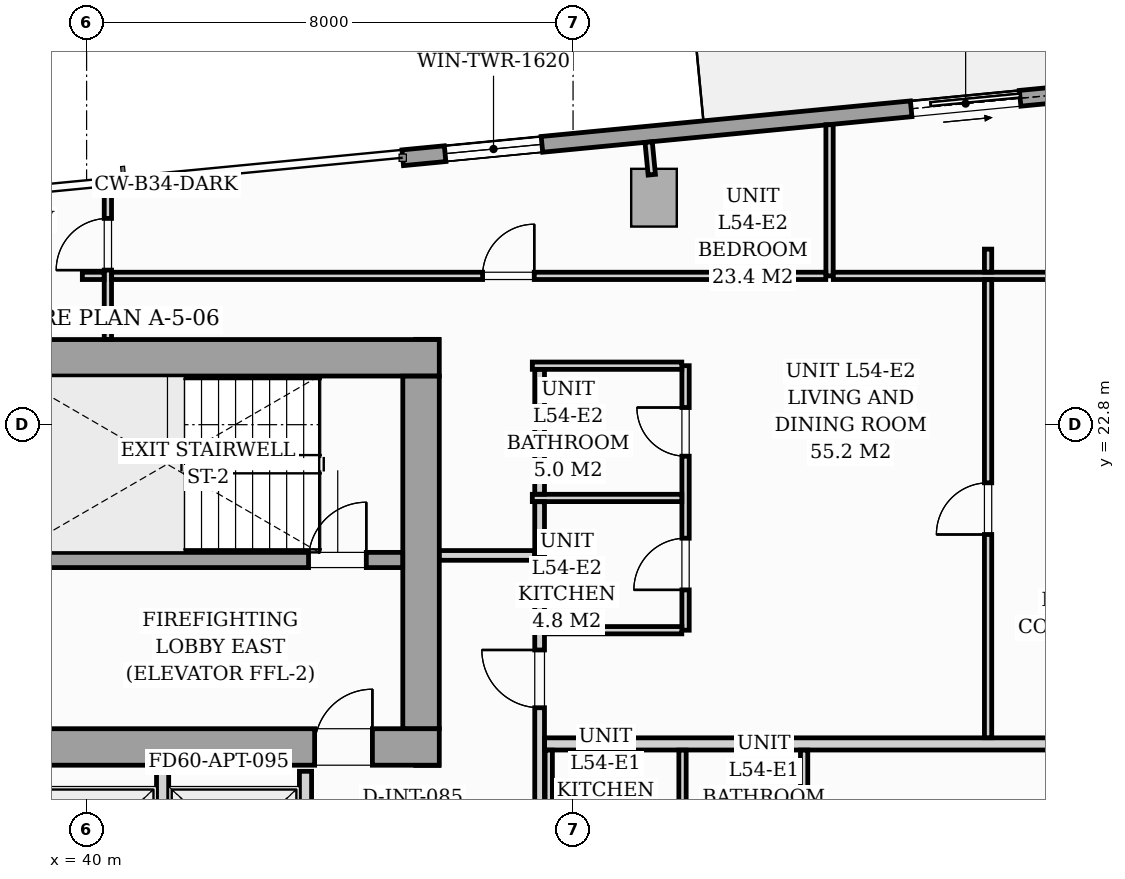
"""IFC4 building model, lengths in metres.
Left out: names, types, materials, properties, quantities, classifications, styles, units other than length and angle.
Written with IfcOpenShell. Run it as: python <this file> out.ifc"""

import sys

from ifc_helpers import new_model, si_unit, direction, frame, frame_2d, origin, origin_2d, place, context, subcontext, project, spatial, rectangle, i_section, extrude, source, transform, mapped, element, fill, save


model = new_model("IFC4")
c1 = context("Model", 3, precision=1e-05, world=origin(), true_north=direction((0.0, 1.0)))
c2 = subcontext(c1, "Body", "Model", "MODEL_VIEW")
j1 = project(units=[si_unit("LENGTHUNIT", "METRE"), si_unit("PLANEANGLEUNIT", "RADIAN")], contexts=[c1])
p1 = place(None, origin())
s1 = spatial("IfcSite", under=j1, at=p1, CompositionType="ELEMENT")
p2 = place(p1, origin())
s2 = spatial("IfcBuilding", under=s1, at=p2, CompositionType="ELEMENT")
p3 = place(p2, frame((0.0, 0.0, 189.0)))
s3 = spatial("IfcBuildingStorey", under=s2, at=p3, CompositionType="ELEMENT", Elevation=189.0)
m1 = source(origin(), c2, "Body", "SweptSolid", [
    extrude(i_section(OverallWidth=0.416, OverallDepth=0.446, WebThickness=0.039, FlangeThickness=0.063, FilletRadius=0.018, at=origin_2d()), origin(), (0.0, 0.0, 1.0), 3.196),
])
for number, where, z_axis, x_axis in (
    (1, (45.6, 17.4, 0.002), (0.0, 0.0, 1.0), (1.0, 0.0, 0.0)),
    (2, (45.6, 24.0, 0.002), (0.0, 0.0, 1.0), (1.0, 0.0, 0.0)),
):
    element("IfcColumn", number, at=place(p3, frame(where, z_axis=z_axis, x_axis=x_axis)), inside=s3, PredefinedType="PILASTER", context=c2, shape_type="MappedRepresentation", body=[
        mapped(m1, transform((0.0, 0.0, 0.0), scale=1.0)),
    ])
m2 = source(origin(), c2, "Body", "SweptSolid", [
    extrude(rectangle(XDim=0.75, YDim=0.95, at=origin_2d()), origin(), (0.0, 0.0, 1.0), 3.196),
])
p4 = place(p3, frame((49.331, 26.533, 0.002), z_axis=(0.0, 0.0, 1.0), x_axis=(0.995396198367, 0.09584575252, 0.0)))
e3 = element("IfcColumn", 3, at=p4, inside=s3, PredefinedType="COLUMN", context=c2, shape_type="MappedRepresentation", body=[
    mapped(m2, transform((0.0, 0.0, 0.0), scale=1.0)),
])
p5 = place(p3, frame((45.199, 27.19, 0.0), z_axis=(0.0, 0.0, 1.0), x_axis=(0.995397074604, 0.095836652014, 0.0)))
e4 = element("IfcWall", 4, at=p5, inside=s3, PredefinedType="STANDARD", context=c2, shape_type="SweptSolid", body=[
    extrude(rectangle(XDim=16.1, YDim=0.26, at=frame_2d((8.05, 0.0))), origin(), (0.0, 0.0, 1.0), 2.94),
])
p6 = place(p5, frame((8.4, 0.0, 0.0)))
e5 = element("IfcOpeningElement", 5, at=p6, cuts=e4, PredefinedType="OPENING", context=c2, shape_type="SweptSolid", body=[
    extrude(rectangle(XDim=1.8, YDim=2.06, at=frame_2d((0.9, 1.03))), frame((0.0, 0.14, 0.0), z_axis=(0.0, -1.0, 0.0), x_axis=(1.0, 0.0, 0.0)), (0.0, 0.0, 1.0), 0.28),
])
p7 = place(p5, frame((0.7, 0.0, 0.65)))
e6 = element("IfcOpeningElement", 6, at=p7, cuts=e4, PredefinedType="OPENING", context=c2, shape_type="SweptSolid", body=[
    extrude(rectangle(XDim=1.6, YDim=1.5, at=frame_2d((0.8, 0.75))), frame((0.0, 0.14, 0.0), z_axis=(0.0, -1.0, 0.0), x_axis=(1.0, 0.0, 0.0)), (0.0, 0.0, 1.0), 0.28),
])
p8 = place(p3, frame((26.2, 17.5, 0.0), z_axis=(0.0, 0.0, 1.0), x_axis=(1.0, 0.0, 0.0)))
e7 = element("IfcWall", 7, at=p8, inside=s3, PredefinedType="SHEAR", context=c2, shape_type="SweptSolid", body=[
    extrude(rectangle(XDim=19.6, YDim=0.6, at=frame_2d((9.8, 0.0))), origin(), (0.0, 0.0, 1.0), 3.2),
])
p9 = place(p8, frame((0.95, 0.0, 0.0)))
e8 = element("IfcOpeningElement", 8, at=p9, cuts=e7, PredefinedType="OPENING", context=c2, shape_type="SweptSolid", body=[
    extrude(rectangle(XDim=0.95, YDim=2.06, at=frame_2d((0.475, 1.03))), frame((0.0, 0.31, 0.0), z_axis=(0.0, -1.0, 0.0), x_axis=(1.0, 0.0, 0.0)), (0.0, 0.0, 1.0), 0.62),
])
p10 = place(p8, frame((9.38, 0.0, 0.0)))
e9 = element("IfcOpeningElement", 9, at=p10, cuts=e7, PredefinedType="OPENING", context=c2, shape_type="SweptSolid", body=[
    extrude(rectangle(XDim=0.85, YDim=2.0, at=frame_2d((0.425, 1.0))), frame((0.0, 0.31, 0.0), z_axis=(0.0, -1.0, 0.0), x_axis=(1.0, 0.0, 0.0)), (0.0, 0.0, 1.0), 0.62),
])
p11 = place(p8, frame((17.55, 0.0, 0.0)))
e10 = element("IfcOpeningElement", 10, at=p11, cuts=e7, PredefinedType="OPENING", context=c2, shape_type="SweptSolid", body=[
    extrude(rectangle(XDim=0.95, YDim=2.06, at=frame_2d((0.475, 1.03))), frame((0.0, 0.31, 0.0), z_axis=(0.0, -1.0, 0.0), x_axis=(1.0, 0.0, 0.0)), (0.0, 0.0, 1.0), 0.62),
])
p12 = place(p3, frame((26.2, 23.9, 0.0), z_axis=(0.0, 0.0, 1.0), x_axis=(1.0, 0.0, 0.0)))
e11 = element("IfcWall", 11, at=p12, inside=s3, PredefinedType="SHEAR", context=c2, shape_type="SweptSolid", body=[
    extrude(rectangle(XDim=19.6, YDim=0.6, at=frame_2d((9.8, 0.0))), origin(), (0.0, 0.0, 1.0), 3.2),
])
p13 = place(p3, frame((45.5, 17.802, 0.0), z_axis=(0.0, 0.0, 1.0), x_axis=(0.0, 1.0, 0.0)))
e12 = element("IfcWall", 12, at=p13, inside=s3, PredefinedType="SHEAR", context=c2, shape_type="SweptSolid", body=[
    extrude(rectangle(XDim=5.796, YDim=0.6, at=frame_2d((2.898, 0.0))), origin(), (0.0, 0.0, 1.0), 3.2),
])
p14 = place(p3, frame((37.05, 20.575, 0.0), z_axis=(0.0, 0.0, 1.0), x_axis=(1.0, 0.0, 0.0)))
e13 = element("IfcWall", 13, at=p14, inside=s3, PredefinedType="SOLIDWALL", context=c2, shape_type="SweptSolid", body=[
    extrude(rectangle(XDim=8.148, YDim=0.25, at=frame_2d((4.074, 0.0))), origin(), (0.0, 0.0, 1.0), 3.2),
])
p15 = place(p14, frame((6.6, 0.0, 0.0)))
e14 = element("IfcOpeningElement", 14, at=p15, cuts=e13, PredefinedType="OPENING", context=c2, shape_type="SweptSolid", body=[
    extrude(rectangle(XDim=0.95, YDim=2.06, at=frame_2d((0.475, 1.03))), frame((0.0, 0.135, 0.0), z_axis=(0.0, -1.0, 0.0), x_axis=(1.0, 0.0, 0.0)), (0.0, 0.0, 1.0), 0.27),
])
for number, where, z_axis, x_axis in (
    (15, (41.25, 14.75, 0.0), (0.0, 0.0, 1.0), (0.0, 1.0, 0.0)),
    (16, (43.6, 14.75, 0.0), (0.0, 0.0, 1.0), (0.0, 1.0, 0.0)),
):
    element("IfcWall", number, at=place(p3, frame(where, z_axis=z_axis, x_axis=x_axis)), inside=s3, PredefinedType="PARTITIONING", context=c2, shape_type="SweptSolid", body=[
        extrude(rectangle(XDim=2.35, YDim=0.2, at=frame_2d((1.175, 0.0))), origin(), (0.0, 0.0, 1.0), 2.94),
    ])
p16 = place(p3, frame((47.45, 13.362, 0.0), z_axis=(0.0, 0.0, 1.0), x_axis=(0.0, 1.0, 0.0)))
e17 = element("IfcWall", 17, at=p16, inside=s3, PredefinedType="PARTITIONING", context=c2, shape_type="SweptSolid", body=[
    extrude(rectangle(XDim=7.288, YDim=0.16, at=frame_2d((3.644, 0.0))), origin(), (0.0, 0.0, 1.0), 2.94),
])
p17 = place(p16, frame((0.493, 0.0, 0.0)))
e18 = element("IfcOpeningElement", 18, at=p17, cuts=e17, PredefinedType="OPENING", context=c2, shape_type="SweptSolid", body=[
    extrude(rectangle(XDim=0.95, YDim=2.06, at=frame_2d((0.475, 1.03))), frame((0.0, 0.09, 0.0), z_axis=(0.0, -1.0, 0.0), x_axis=(1.0, 0.0, 0.0)), (0.0, 0.0, 1.0), 0.18),
])
p18 = place(p16, frame((4.783, 0.0, 0.0)))
e19 = element("IfcOpeningElement", 19, at=p18, cuts=e17, PredefinedType="OPENING", context=c2, shape_type="SweptSolid", body=[
    extrude(rectangle(XDim=0.95, YDim=2.06, at=frame_2d((0.475, 1.03))), frame((0.0, 0.09, 0.0), z_axis=(0.0, -1.0, 0.0), x_axis=(1.0, 0.0, 0.0)), (0.0, 0.0, 1.0), 0.18),
])
p19 = place(p3, frame((45.802, 20.65, 0.0), z_axis=(0.0, 0.0, 1.0), x_axis=(1.0, 0.0, 0.0)))
e20 = element("IfcWall", 20, at=p19, inside=s3, PredefinedType="PARTITIONING", context=c2, shape_type="SweptSolid", body=[
    extrude(rectangle(XDim=1.566, YDim=0.16, at=frame_2d((0.783, 0.0))), origin(), (0.0, 0.0, 1.0), 2.94),
])
p20 = place(p3, frame((47.532, 17.55, 0.0), z_axis=(0.0, 0.0, 1.0), x_axis=(1.0, 0.0, 0.0)))
e21 = element("IfcWall", 21, at=p20, inside=s3, PredefinedType="PARTITIONING", context=c2, shape_type="SweptSolid", body=[
    extrude(rectangle(XDim=17.201, YDim=0.2, at=frame_2d((8.601, 0.0))), origin(), (0.0, 0.0, 1.0), 2.281),
])
for number, where, z_axis, x_axis in (
    (22, (47.6, 15.262, 0.0), (0.0, 0.0, 1.0), (0.0, 1.0, 0.0)),
    (23, (49.8, 15.262, 0.0), (0.0, 0.0, 1.0), (0.0, 1.0, 0.0)),
    (24, (51.8, 15.262, 0.0), (0.0, 0.0, 1.0), (0.0, 1.0, 0.0)),
):
    element("IfcWall", number, at=place(p3, frame(where, z_axis=z_axis, x_axis=x_axis)), inside=s3, PredefinedType="PARTITIONING", context=c2, shape_type="SweptSolid", body=[
        extrude(rectangle(XDim=2.186, YDim=0.12, at=frame_2d((1.093, 0.0))), origin(), (0.0, 0.0, 1.0), 2.94),
    ])
p21 = place(p3, frame((49.85, 19.42, 0.0), z_axis=(0.0, 0.0, 1.0), x_axis=(0.0, 1.0, 0.0)))
e25 = element("IfcWall", 25, at=p21, inside=s3, PredefinedType="PARTITIONING", context=c2, shape_type="SweptSolid", body=[
    extrude(rectangle(XDim=4.35, YDim=0.12, at=frame_2d((2.175, 0.0))), origin(), (0.0, 0.0, 1.0), 2.94),
])
p22 = place(p21, frame((0.663, 0.0, 0.0)))
e26 = element("IfcOpeningElement", 26, at=p22, cuts=e25, PredefinedType="OPENING", context=c2, shape_type="SweptSolid", body=[
    extrude(rectangle(XDim=0.85, YDim=2.05, at=frame_2d((0.425, 1.025))), frame((0.0, 0.07, 0.0), z_axis=(0.0, -1.0, 0.0), x_axis=(1.0, 0.0, 0.0)), (0.0, 0.0, 1.0), 0.14),
])
p23 = place(p21, frame((2.862, 0.0, 0.0)))
e27 = element("IfcOpeningElement", 27, at=p23, cuts=e25, PredefinedType="OPENING", context=c2, shape_type="SweptSolid", body=[
    extrude(rectangle(XDim=0.8, YDim=2.02, at=frame_2d((0.4, 1.01))), frame((0.0, 0.07, 0.0), z_axis=(0.0, -1.0, 0.0), x_axis=(1.0, 0.0, 0.0)), (0.0, 0.0, 1.0), 0.14),
])
p24 = place(p3, frame((47.33, 21.595, 0.0), z_axis=(0.0, 0.0, 1.0), x_axis=(1.0, 0.0, 0.0)))
e28 = element("IfcWall", 28, at=p24, inside=s3, PredefinedType="PARTITIONING", context=c2, shape_type="SweptSolid", body=[
    extrude(rectangle(XDim=2.458, YDim=0.12, at=frame_2d((1.229, 0.0))), origin(), (0.0, 0.0, 1.0), 2.94),
])
p25 = place(p3, frame((47.532, 19.42, 0.0), z_axis=(0.0, 0.0, 1.0), x_axis=(1.0, 0.0, 0.0)))
e29 = element("IfcWall", 29, at=p25, inside=s3, PredefinedType="PARTITIONING", context=c2, shape_type="SweptSolid", body=[
    extrude(rectangle(XDim=2.256, YDim=0.12, at=frame_2d((1.128, 0.0))), origin(), (0.0, 0.0, 1.0), 2.94),
])
p26 = place(p3, frame((47.33, 23.77, 0.0), z_axis=(0.0, 0.0, 1.0), x_axis=(1.0, 0.0, 0.0)))
e30 = element("IfcWall", 30, at=p26, inside=s3, PredefinedType="PARTITIONING", context=c2, shape_type="SweptSolid", body=[
    extrude(rectangle(XDim=2.458, YDim=0.12, at=frame_2d((1.229, 0.0))), origin(), (0.0, 0.0, 1.0), 2.94),
])
p27 = place(p3, frame((47.45, 20.65, 0.0), z_axis=(0.0, 0.0, 1.0), x_axis=(0.0, 1.0, 0.0)))
e31 = element("IfcWall", 31, at=p27, inside=s3, PredefinedType="PARTITIONING", context=c2, shape_type="SweptSolid", body=[
    extrude(rectangle(XDim=0.883, YDim=0.16, at=frame_2d((0.441, 0.0))), origin(), (0.0, 0.0, 1.0), 2.94),
])
p28 = place(p3, frame((47.45, 21.657, 0.0), z_axis=(0.0, 0.0, 1.0), x_axis=(0.0, 1.0, 0.0)))
e32 = element("IfcWall", 32, at=p28, inside=s3, PredefinedType="PARTITIONING", context=c2, shape_type="SweptSolid", body=[
    extrude(rectangle(XDim=2.051, YDim=0.16, at=frame_2d((1.025, 0.0))), origin(), (0.0, 0.0, 1.0), 2.94),
])
p29 = place(p3, frame((40.35, 24.202, 0.0), z_axis=(0.0, 0.0, 1.0), x_axis=(0.0, 1.0, 0.0)))
e33 = element("IfcWall", 33, at=p29, inside=s3, PredefinedType="PARTITIONING", context=c2, shape_type="SweptSolid", body=[
    extrude(rectangle(XDim=2.571, YDim=0.12, at=frame_2d((1.286, 0.0))), origin(), (0.0, 0.0, 1.0), 2.94),
])
p30 = place(p29, frame((1.14, 0.0, 0.0)))
e34 = element("IfcOpeningElement", 34, at=p30, cuts=e33, PredefinedType="OPENING", context=c2, shape_type="SweptSolid", body=[
    extrude(rectangle(XDim=0.85, YDim=2.05, at=frame_2d((0.425, 1.025))), frame((0.0, 0.07, 0.0), z_axis=(0.0, -1.0, 0.0), x_axis=(1.0, 0.0, 0.0)), (0.0, 0.0, 1.0), 0.14),
])
p31 = place(p3, frame((52.218, 25.247, 0.0), z_axis=(0.0, 0.0, 1.0), x_axis=(0.0, 1.0, 0.0)))
e35 = element("IfcWall", 35, at=p31, inside=s3, PredefinedType="PARTITIONING", context=c2, shape_type="SweptSolid", body=[
    extrude(rectangle(XDim=2.486, YDim=0.12, at=frame_2d((1.243, 0.0))), origin(), (0.0, 0.0, 1.0), 2.94),
])
p32 = place(p3, frame((39.93, 25.247, 0.0), z_axis=(0.0, 0.0, 1.0), x_axis=(1.0, 0.0, 0.0)))
e36 = element("IfcWall", 36, at=p32, inside=s3, PredefinedType="PARTITIONING", context=c2, shape_type="SweptSolid", body=[
    extrude(rectangle(XDim=0.358, YDim=0.12, at=frame_2d((0.179, 0.0))), origin(), (0.0, 0.0, 1.0), 2.94),
])
p33 = place(p3, frame((40.412, 25.247, 0.0), z_axis=(0.0, 0.0, 1.0), x_axis=(1.0, 0.0, 0.0)))
e37 = element("IfcWall", 37, at=p33, inside=s3, PredefinedType="PARTITIONING", context=c2, shape_type="SweptSolid", body=[
    extrude(rectangle(XDim=11.744, YDim=0.12, at=frame_2d((5.872, 0.0))), origin(), (0.0, 0.0, 1.0), 2.94),
])
p34 = place(p33, frame((6.1, 0.0, 0.0)))
e38 = element("IfcOpeningElement", 38, at=p34, cuts=e37, PredefinedType="OPENING", context=c2, shape_type="SweptSolid", body=[
    extrude(rectangle(XDim=0.85, YDim=2.05, at=frame_2d((0.425, 1.025))), frame((0.0, 0.07, 0.0), z_axis=(0.0, -1.0, 0.0), x_axis=(1.0, 0.0, 0.0)), (0.0, 0.0, 1.0), 0.14),
])
p35 = place(p3, frame((52.28, 25.247, 0.0), z_axis=(0.0, 0.0, 1.0), x_axis=(1.0, 0.0, 0.0)))
e39 = element("IfcWall", 39, at=p35, inside=s3, PredefinedType="PARTITIONING", context=c2, shape_type="SweptSolid", body=[
    extrude(rectangle(XDim=11.712, YDim=0.12, at=frame_2d((5.856, 0.0))), origin(), (0.0, 0.0, 1.0), 2.94),
])
p36 = place(p35, frame((5.247, 0.0, 0.0)))
e40 = element("IfcOpeningElement", 40, at=p36, cuts=e39, PredefinedType="OPENING", context=c2, shape_type="SweptSolid", body=[
    extrude(rectangle(XDim=0.85, YDim=2.05, at=frame_2d((0.425, 1.025))), frame((0.0, 0.07, 0.0), z_axis=(0.0, -1.0, 0.0), x_axis=(1.0, 0.0, 0.0)), (0.0, 0.0, 1.0), 0.14),
])
p37 = place(p3, frame((54.825, 17.652, 0.0), z_axis=(0.0, 0.0, 1.0), x_axis=(0.0, 1.0, 0.0)))
e41 = element("IfcWall", 41, at=p37, inside=s3, PredefinedType="PARTITIONING", context=c2, shape_type="SweptSolid", body=[
    extrude(rectangle(XDim=7.533, YDim=0.12, at=frame_2d((3.767, 0.0))), origin(), (0.0, 0.0, 1.0), 2.94),
])
p38 = place(p37, frame((3.342, 0.0, 0.0)))
e42 = element("IfcOpeningElement", 42, at=p38, cuts=e41, PredefinedType="OPENING", context=c2, shape_type="SweptSolid", body=[
    extrude(rectangle(XDim=0.85, YDim=2.05, at=frame_2d((0.425, 1.025))), frame((0.0, 0.07, 0.0), z_axis=(0.0, -1.0, 0.0), x_axis=(1.0, 0.0, 0.0)), (0.0, 0.0, 1.0), 0.14),
])
p39 = place(p3, frame((54.825, 25.309, 0.0), z_axis=(0.0, 0.0, 1.0), x_axis=(0.0, 1.0, 0.0)))
e43 = element("IfcWall", 43, at=p39, inside=s3, PredefinedType="PARTITIONING", context=c2, shape_type="SweptSolid", body=[
    extrude(rectangle(XDim=0.378, YDim=0.12, at=frame_2d((0.189, 0.0))), origin(), (0.0, 0.0, 1.0), 2.94),
])
p40 = place(p3, frame((49.294, 26.911, 0.0), z_axis=(0.0, 0.0, 1.0), x_axis=(-0.095772948675, 0.995403205893, 0.0)))
e44 = element("IfcWall", 44, at=p40, inside=s3, PredefinedType="PARTITIONING", context=c2, shape_type="SweptSolid", body=[
    extrude(rectangle(XDim=0.538, YDim=0.12, at=frame_2d((0.269, 0.0))), origin(), (0.0, 0.0, 1.0), 2.94),
])
m3 = source(origin(), c2, "Body", "SweptSolid", [
    extrude(rectangle(XDim=1.8, YDim=2.06, at=frame_2d((0.9, 1.03))), frame((0.0, 0.025, 0.0), z_axis=(0.0, -1.0, 0.0), x_axis=(1.0, 0.0, 0.0)), (0.0, 0.0, 1.0), 0.05),
])
p41 = place(p6, origin())
e45 = element("IfcDoor", 45, at=p41, inside=s3, OperationType="SLIDING_TO_RIGHT", PredefinedType="DOOR", context=c2, shape_type="MappedRepresentation", body=[
    mapped(m3, transform((0.0, 0.0, 0.0), scale=1.0)),
])
fill(e5, e45)
m4 = source(origin(), c2, "Body", "SweptSolid", [
    extrude(rectangle(XDim=1.6, YDim=1.5, at=frame_2d((0.8, 0.75))), frame((0.0, 0.03, 0.0), z_axis=(0.0, -1.0, 0.0), x_axis=(1.0, 0.0, 0.0)), (0.0, 0.0, 1.0), 0.06),
])
p42 = place(p7, origin())
e46 = element("IfcWindow", 46, at=p42, inside=s3, PartitioningType="SINGLE_PANEL", PredefinedType="WINDOW", context=c2, shape_type="MappedRepresentation", body=[
    mapped(m4, transform((0.0, 0.0, 0.0), scale=1.0)),
])
fill(e6, e46)
m5 = source(origin(), c2, "Body", "SweptSolid", [
    extrude(rectangle(XDim=0.95, YDim=2.06, at=frame_2d((0.475, 1.03))), frame((0.0, 0.025, 0.0), z_axis=(0.0, -1.0, 0.0), x_axis=(1.0, 0.0, 0.0)), (0.0, 0.0, 1.0), 0.05),
])
p43 = place(p11, origin())
e47 = element("IfcDoor", 47, at=p43, inside=s3, OperationType="SINGLE_SWING_RIGHT", PredefinedType="DOOR", context=c2, shape_type="MappedRepresentation", body=[
    mapped(m5, transform((0.0, 0.0, 0.0), scale=1.0)),
])
fill(e10, e47)
p44 = place(p15, origin())
e48 = element("IfcDoor", 48, at=p44, inside=s3, OperationType="SINGLE_SWING_RIGHT", PredefinedType="DOOR", context=c2, shape_type="MappedRepresentation", body=[
    mapped(m5, transform((0.0, 0.0, 0.0), scale=1.0)),
])
fill(e14, e48)
m6 = source(origin(), c2, "Body", "SweptSolid", [
    extrude(rectangle(XDim=0.95, YDim=2.06, at=frame_2d((0.475, 1.03))), frame((0.0, 0.025, 0.0), z_axis=(0.0, -1.0, 0.0), x_axis=(1.0, 0.0, 0.0)), (0.0, 0.0, 1.0), 0.05),
])
p45 = place(p18, origin())
e49 = element("IfcDoor", 49, at=p45, inside=s3, OperationType="SINGLE_SWING_RIGHT", PredefinedType="DOOR", context=c2, shape_type="MappedRepresentation", body=[
    mapped(m6, transform((0.0, 0.0, 0.0), scale=1.0)),
])
fill(e19, e49)
m7 = source(origin(), c2, "Body", "SweptSolid", [
    extrude(rectangle(XDim=0.85, YDim=2.05, at=frame_2d((0.425, 1.025))), frame((0.0, 0.025, 0.0), z_axis=(0.0, -1.0, 0.0), x_axis=(1.0, 0.0, 0.0)), (0.0, 0.0, 1.0), 0.05),
])
p46 = place(p22, origin())
e50 = element("IfcDoor", 50, at=p46, inside=s3, OperationType="SINGLE_SWING_LEFT", PredefinedType="DOOR", context=c2, shape_type="MappedRepresentation", body=[
    mapped(m7, transform((0.0, 0.0, 0.0), scale=1.0)),
])
fill(e26, e50)
m8 = source(origin(), c2, "Body", "SweptSolid", [
    extrude(rectangle(XDim=0.8, YDim=2.02, at=frame_2d((0.4, 1.01))), frame((0.0, 0.025, 0.0), z_axis=(0.0, -1.0, 0.0), x_axis=(1.0, 0.0, 0.0)), (0.0, 0.0, 1.0), 0.05),
])
p47 = place(p23, origin())
e51 = element("IfcDoor", 51, at=p47, inside=s3, OperationType="SINGLE_SWING_RIGHT", PredefinedType="DOOR", context=c2, shape_type="MappedRepresentation", body=[
    mapped(m8, transform((0.0, 0.0, 0.0), scale=1.0)),
])
fill(e27, e51)
p48 = place(p30, origin())
e52 = element("IfcDoor", 52, at=p48, inside=s3, OperationType="SINGLE_SWING_LEFT", PredefinedType="DOOR", context=c2, shape_type="MappedRepresentation", body=[
    mapped(m7, transform((0.0, 0.0, 0.0), scale=1.0)),
])
fill(e34, e52)
p49 = place(p34, origin())
e53 = element("IfcDoor", 53, at=p49, inside=s3, OperationType="SINGLE_SWING_RIGHT", PredefinedType="DOOR", context=c2, shape_type="MappedRepresentation", body=[
    mapped(m7, transform((0.0, 0.0, 0.0), scale=1.0)),
])
fill(e38, e53)
p50 = place(p38, origin())
e54 = element("IfcDoor", 54, at=p50, inside=s3, OperationType="SINGLE_SWING_LEFT", PredefinedType="DOOR", context=c2, shape_type="MappedRepresentation", body=[
    mapped(m7, transform((0.0, 0.0, 0.0), scale=1.0)),
])
fill(e42, e54)
save(model, sys.argv[1])
